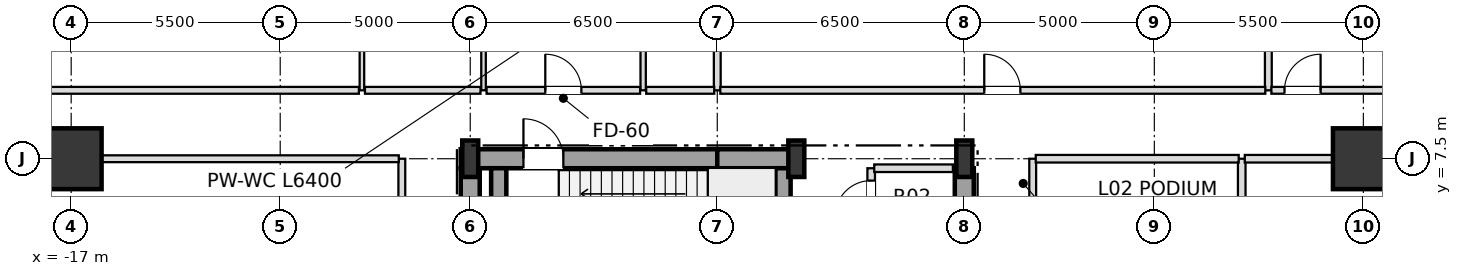
"""IFC4 building model, lengths in metres.
Left out: names, types, materials, properties, quantities, classifications, styles, units other than length and angle.
Written with IfcOpenShell. Run it as: python <this file> out.ifc"""

import sys

from ifc_helpers import new_model, si_unit, direction, frame, frame_2d, origin, origin_2d, place, context, subcontext, project, spatial, rectangle, i_section, extrude, element, fill, save


model = new_model("IFC4")
c1 = context("Model", 3, precision=1e-05, world=origin(), true_north=direction((0.0, 1.0)))
c2 = subcontext(c1, "Body", "Model", "MODEL_VIEW")
j1 = project(units=[si_unit("LENGTHUNIT", "METRE"), si_unit("PLANEANGLEUNIT", "RADIAN")], contexts=[c1])
p1 = place(None, origin())
s1 = spatial("IfcSite", under=j1, at=p1, CompositionType="ELEMENT")
p2 = place(p1, origin())
s2 = spatial("IfcBuilding", under=s1, at=p2, CompositionType="ELEMENT")
p3 = place(p2, frame((0.0, 0.0, 11.4)))
s3 = spatial("IfcBuildingStorey", under=s2, at=p3, CompositionType="ELEMENT", Elevation=11.4)
for number, where, z_axis, x_axis in (
    (1, (-6.5, 7.5, 0.0), (0.0, 0.0, 1.0), (1.0, 0.0, 0.0)),
    (2, (2.08, 7.5, 0.0), (0.0, 0.0, 1.0), (1.0, 0.0, 0.0)),
    (3, (6.5, 7.5, 0.0), (0.0, 0.0, 1.0), (1.0, 0.0, 0.0)),
):
    element("IfcColumn", number, at=place(p3, frame(where, z_axis=z_axis, x_axis=x_axis)), inside=s3, PredefinedType="COLUMN", context=c2, shape_type="SweptSolid", body=[
        extrude(i_section(OverallWidth=0.42, OverallDepth=0.96, WebThickness=0.022, FlangeThickness=0.034, at=origin_2d()), origin(), (0.0, 0.0, 1.0), 5.4),
    ])
for number, where, z_axis, x_axis in (
    (4, (17.0, 7.5, 0.0), (0.0, 0.0, 1.0), (1.0, 0.0, 0.0)),
    (5, (-17.0, 7.5, 0.0), (0.0, 0.0, 1.0), (1.0, 0.0, 0.0)),
):
    element("IfcColumn", number, at=place(p3, frame(where, z_axis=z_axis, x_axis=x_axis)), inside=s3, PredefinedType="USERDEFINED", context=c2, shape_type="SweptSolid", body=[
        extrude(rectangle(XDim=1.6, YDim=1.6, at=origin_2d()), origin(), (0.0, 0.0, 1.0), 5.4),
    ])
p4 = place(p3, frame((-6.75, 7.5, 0.0), z_axis=(0.0, 0.0, 1.0), x_axis=(1.0, 0.0, 0.0)))
e6 = element("IfcWall", 6, at=p4, inside=s3, PredefinedType="SHEAR", context=c2, shape_type="SweptSolid", body=[
    extrude(rectangle(XDim=6.75, YDim=0.5, at=frame_2d((3.375, 0.0))), origin(), (0.0, 0.0, 1.0), 5.12),
])
p5 = place(p4, frame((1.65, 0.0, 0.0)))
e7 = element("IfcOpeningElement", 7, at=p5, cuts=e6, PredefinedType="OPENING", context=c2, shape_type="SweptSolid", body=[
    extrude(rectangle(XDim=1.05, YDim=2.15, at=frame_2d((0.525, 1.075))), frame((0.0, 0.26, 0.0), z_axis=(0.0, -1.0, 0.0), x_axis=(1.0, 0.0, 0.0)), (0.0, 0.0, 1.0), 0.52),
])
p6 = place(p3, frame((0.0, 7.5, 0.0), z_axis=(0.0, 0.0, 1.0), x_axis=(1.0, 0.0, 0.0)))
e8 = element("IfcWall", 8, at=p6, inside=s3, PredefinedType="SHEAR", context=c2, shape_type="SweptSolid", body=[
    extrude(rectangle(XDim=2.08, YDim=0.5, at=frame_2d((1.04, 0.0))), origin(), (0.0, 0.0, 1.0), 5.12),
])
for number, where, z_axis, x_axis in (
    (9, (-6.5, 3.95, 0.0), (0.0, 0.0, 1.0), (0.0, 1.0, 0.0)),
    (10, (6.5, 3.95, 0.0), (0.0, 0.0, 1.0), (0.0, 1.0, 0.0)),
):
    element("IfcWall", number, at=place(p3, frame(where, z_axis=z_axis, x_axis=x_axis)), inside=s3, PredefinedType="SHEAR", context=c2, shape_type="SweptSolid", body=[
        extrude(rectangle(XDim=3.3, YDim=0.5, at=frame_2d((1.65, 0.0))), origin(), (0.0, 0.0, 1.0), 5.12),
    ])
for number, where, z_axis, x_axis in (
    (11, (1.73, 3.95, 0.0), (0.0, 0.0, 1.0), (0.0, 1.0, 0.0)),
    (12, (-5.75, 3.95, 0.0), (0.0, 0.0, 1.0), (0.0, 1.0, 0.0)),
):
    element("IfcWall", number, at=place(p3, frame(where, z_axis=z_axis, x_axis=x_axis)), inside=s3, PredefinedType="SHEAR", context=c2, shape_type="SweptSolid", body=[
        extrude(rectangle(XDim=3.3, YDim=0.4, at=frame_2d((1.65, 0.0))), origin(), (0.0, 0.0, 1.0), 5.12),
    ])
p7 = place(p3, frame((-9.35, 9.3, 0.0), z_axis=(0.0, 0.0, 1.0), x_axis=(0.0, 1.0, 0.0)))
e13 = element("IfcWall", 13, at=p7, inside=s3, PredefinedType="PARTITIONING", context=c2, shape_type="SweptSolid", body=[
    extrude(rectangle(XDim=6.4, YDim=0.12, at=frame_2d((3.2, 0.0))), origin(), (0.0, 0.0, 1.0), 4.41),
])
p8 = place(p7, frame((2.75, 0.0, 0.0)))
e14 = element("IfcOpeningElement", 14, at=p8, cuts=e13, PredefinedType="OPENING", context=c2, shape_type="SweptSolid", body=[
    extrude(rectangle(XDim=0.9, YDim=2.1, at=frame_2d((0.45, 1.05))), frame((0.0, 0.07, 0.0), z_axis=(0.0, -1.0, 0.0), x_axis=(1.0, 0.0, 0.0)), (0.0, 0.0, 1.0), 0.14),
])
p9 = place(p3, frame((-8.3, -7.5, 0.0), z_axis=(0.0, 0.0, 1.0), x_axis=(0.0, 1.0, 0.0)))
e15 = element("IfcWall", 15, at=p9, inside=s3, PredefinedType="PARTITIONING", context=c2, shape_type="SweptSolid", body=[
    extrude(rectangle(XDim=15.0, YDim=0.18, at=frame_2d((7.5, 0.0))), origin(), (0.0, 0.0, 1.0), 5.12),
])
p10 = place(p9, frame((7.025, 0.0, 0.0)))
e16 = element("IfcOpeningElement", 16, at=p10, cuts=e15, PredefinedType="OPENING", context=c2, shape_type="SweptSolid", body=[
    extrude(rectangle(XDim=0.95, YDim=2.15, at=frame_2d((0.475, 1.075))), frame((0.0, 0.1, 0.0), z_axis=(0.0, -1.0, 0.0), x_axis=(1.0, 0.0, 0.0)), (0.0, 0.0, 1.0), 0.2),
])
p11 = place(p3, frame((-6.15, 9.3, 0.0), z_axis=(0.0, 0.0, 1.0), x_axis=(0.0, 1.0, 0.0)))
e17 = element("IfcWall", 17, at=p11, inside=s3, PredefinedType="PARTITIONING", context=c2, shape_type="SweptSolid", body=[
    extrude(rectangle(XDim=6.4, YDim=0.12, at=frame_2d((3.2, 0.0))), origin(), (0.0, 0.0, 1.0), 5.12),
])
p12 = place(p11, frame((2.725, 0.0, 0.0)))
e18 = element("IfcOpeningElement", 18, at=p12, cuts=e17, PredefinedType="OPENING", context=c2, shape_type="SweptSolid", body=[
    extrude(rectangle(XDim=0.95, YDim=2.1, at=frame_2d((0.475, 1.05))), frame((0.0, 0.07, 0.0), z_axis=(0.0, -1.0, 0.0), x_axis=(1.0, 0.0, 0.0)), (0.0, 0.0, 1.0), 0.14),
])
p13 = place(p3, frame((-1.95, 9.3, 0.0), z_axis=(0.0, 0.0, 1.0), x_axis=(0.0, 1.0, 0.0)))
e19 = element("IfcWall", 19, at=p13, inside=s3, PredefinedType="PARTITIONING", context=c2, shape_type="SweptSolid", body=[
    extrude(rectangle(XDim=6.4, YDim=0.14, at=frame_2d((3.2, 0.0))), origin(), (0.0, 0.0, 1.0), 5.12),
])
p14 = place(p13, frame((2.75, 0.0, 0.0)))
e20 = element("IfcOpeningElement", 20, at=p14, cuts=e19, PredefinedType="OPENING", context=c2, shape_type="SweptSolid", body=[
    extrude(rectangle(XDim=0.9, YDim=2.1, at=frame_2d((0.45, 1.05))), frame((0.0, 0.08, 0.0), z_axis=(0.0, -1.0, 0.0), x_axis=(1.0, 0.0, 0.0)), (0.0, 0.0, 1.0), 0.16),
])
p15 = place(p3, frame((0.0, 9.3, 0.0), z_axis=(0.0, 0.0, 1.0), x_axis=(0.0, 1.0, 0.0)))
e21 = element("IfcWall", 21, at=p15, inside=s3, PredefinedType="PARTITIONING", context=c2, shape_type="SweptSolid", body=[
    extrude(rectangle(XDim=12.455, YDim=0.18, at=frame_2d((6.228, 0.0))), origin(), (0.0, 0.0, 1.0), 4.476),
])
p16 = place(p3, frame((4.05, 4.2, 0.0), z_axis=(0.0, 0.0, 1.0), x_axis=(0.0, 1.0, 0.0)))
e22 = element("IfcWall", 22, at=p16, inside=s3, PredefinedType="SOLIDWALL", context=c2, shape_type="SweptSolid", body=[
    extrude(rectangle(XDim=3.05, YDim=0.2, at=frame_2d((1.525, 0.0))), origin(), (0.0, 0.0, 1.0), 5.12),
])
p17 = place(p16, frame((0.275, 0.0, 0.0)))
e23 = element("IfcOpeningElement", 23, at=p17, cuts=e22, PredefinedType="OPENING", context=c2, shape_type="SweptSolid", body=[
    extrude(rectangle(XDim=0.95, YDim=2.15, at=frame_2d((0.475, 1.075))), frame((0.0, 0.11, 0.0), z_axis=(0.0, -1.0, 0.0), x_axis=(1.0, 0.0, 0.0)), (0.0, 0.0, 1.0), 0.22),
])
p18 = place(p16, frame((1.775, 0.0, 0.0)))
e24 = element("IfcOpeningElement", 24, at=p18, cuts=e22, PredefinedType="OPENING", context=c2, shape_type="SweptSolid", body=[
    extrude(rectangle(XDim=0.95, YDim=2.15, at=frame_2d((0.475, 1.075))), frame((0.0, 0.11, 0.0), z_axis=(0.0, -1.0, 0.0), x_axis=(1.0, 0.0, 0.0)), (0.0, 0.0, 1.0), 0.22),
])
p19 = place(p3, frame((8.3, -7.5, 0.0), z_axis=(0.0, 0.0, 1.0), x_axis=(0.0, 1.0, 0.0)))
e25 = element("IfcWall", 25, at=p19, inside=s3, PredefinedType="PARTITIONING", context=c2, shape_type="SweptSolid", body=[
    extrude(rectangle(XDim=15.0, YDim=0.18, at=frame_2d((7.5, 0.0))), origin(), (0.0, 0.0, 1.0), 5.12),
])
p20 = place(p19, frame((5.025, 0.0, 0.0)))
e26 = element("IfcOpeningElement", 26, at=p20, cuts=e25, PredefinedType="OPENING", context=c2, shape_type="SweptSolid", body=[
    extrude(rectangle(XDim=0.95, YDim=2.15, at=frame_2d((0.475, 1.075))), frame((0.0, 0.1, 0.0), z_axis=(0.0, -1.0, 0.0), x_axis=(1.0, 0.0, 0.0)), (0.0, 0.0, 1.0), 0.2),
])
p21 = place(p19, frame((12.225, 0.0, 0.0)))
e27 = element("IfcOpeningElement", 27, at=p21, cuts=e25, PredefinedType="OPENING", context=c2, shape_type="SweptSolid", body=[
    extrude(rectangle(XDim=0.95, YDim=2.15, at=frame_2d((0.475, 1.075))), frame((0.0, 0.1, 0.0), z_axis=(0.0, -1.0, 0.0), x_axis=(1.0, 0.0, 0.0)), (0.0, 0.0, 1.0), 0.2),
])
p22 = place(p3, frame((13.8, 3.2, 0.0), z_axis=(0.0, 0.0, 1.0), x_axis=(0.0, 1.0, 0.0)))
e28 = element("IfcWall", 28, at=p22, inside=s3, PredefinedType="SOLIDWALL", context=c2, shape_type="SweptSolid", body=[
    extrude(rectangle(XDim=4.3, YDim=0.2, at=frame_2d((2.15, 0.0))), origin(), (0.0, 0.0, 1.0), 5.12),
])
p23 = place(p3, frame((14.5, 9.3, 0.0), z_axis=(0.0, 0.0, 1.0), x_axis=(0.0, 1.0, 0.0)))
e29 = element("IfcWall", 29, at=p23, inside=s3, PredefinedType="PARTITIONING", context=c2, shape_type="SweptSolid", body=[
    extrude(rectangle(XDim=12.395, YDim=0.18, at=frame_2d((6.198, 0.0))), origin(), (0.0, 0.0, 1.0), 4.41),
])
p24 = place(p3, frame((4.13, 7.25, 0.0), z_axis=(0.0, 0.0, 1.0), x_axis=(1.0, 0.0, 0.0)))
e30 = element("IfcWall", 30, at=p24, inside=s3, PredefinedType="SOLIDWALL", context=c2, shape_type="SweptSolid", body=[
    extrude(rectangle(XDim=2.07, YDim=0.2, at=frame_2d((1.035, 0.0))), origin(), (0.0, 0.0, 1.0), 4.41),
])
p25 = place(p3, frame((-22.695, 7.5, 0.0), z_axis=(0.0, 0.0, 1.0), x_axis=(1.0, 0.0, 0.0)))
e31 = element("IfcWall", 31, at=p25, inside=s3, PredefinedType="PARTITIONING", context=c2, shape_type="SweptSolid", body=[
    extrude(rectangle(XDim=14.315, YDim=0.18, at=frame_2d((7.158, 0.0))), origin(), (0.0, 0.0, 1.0), 4.41),
])
p26 = place(p3, frame((8.38, 7.5, 0.0), z_axis=(0.0, 0.0, 1.0), x_axis=(1.0, 0.0, 0.0)))
e32 = element("IfcWall", 32, at=p26, inside=s3, PredefinedType="SOLIDWALL", context=c2, shape_type="SweptSolid", body=[
    extrude(rectangle(XDim=5.34, YDim=0.2, at=frame_2d((2.67, 0.0))), origin(), (0.0, 0.0, 1.0), 4.41),
])
p27 = place(p3, frame((13.88, 7.5, 0.0), z_axis=(0.0, 0.0, 1.0), x_axis=(1.0, 0.0, 0.0)))
e33 = element("IfcWall", 33, at=p27, inside=s3, PredefinedType="SOLIDWALL", context=c2, shape_type="SweptSolid", body=[
    extrude(rectangle(XDim=8.855, YDim=0.2, at=frame_2d((4.428, 0.0))), origin(), (0.0, 0.0, 1.0), 4.41),
])
p28 = place(p3, frame((-22.695, 9.3, 0.0), z_axis=(0.0, 0.0, 1.0), x_axis=(1.0, 0.0, 0.0)))
e34 = element("IfcWall", 34, at=p28, inside=s3, PredefinedType="PARTITIONING", context=c2, shape_type="SweptSolid", body=[
    extrude(rectangle(XDim=13.265, YDim=0.18, at=frame_2d((6.633, 0.0))), origin(), (0.0, 0.0, 1.0), 4.41),
])
p29 = place(p3, frame((-9.27, 9.3, 0.0), z_axis=(0.0, 0.0, 1.0), x_axis=(1.0, 0.0, 0.0)))
e35 = element("IfcWall", 35, at=p29, inside=s3, PredefinedType="PARTITIONING", context=c2, shape_type="SweptSolid", body=[
    extrude(rectangle(XDim=3.04, YDim=0.18, at=frame_2d((1.52, 0.0))), origin(), (0.0, 0.0, 1.0), 4.41),
])
p30 = place(p3, frame((-6.07, 9.3, 0.0), z_axis=(0.0, 0.0, 1.0), x_axis=(1.0, 0.0, 0.0)))
e36 = element("IfcWall", 36, at=p30, inside=s3, PredefinedType="PARTITIONING", context=c2, shape_type="SweptSolid", body=[
    extrude(rectangle(XDim=4.04, YDim=0.18, at=frame_2d((2.02, 0.0))), origin(), (0.0, 0.0, 1.0), 5.12),
])
p31 = place(p30, frame((1.545, 0.0, 0.0)))
e37 = element("IfcOpeningElement", 37, at=p31, cuts=e36, PredefinedType="OPENING", context=c2, shape_type="SweptSolid", body=[
    extrude(rectangle(XDim=0.95, YDim=2.15, at=frame_2d((0.475, 1.075))), frame((0.0, 0.1, 0.0), z_axis=(0.0, -1.0, 0.0), x_axis=(1.0, 0.0, 0.0)), (0.0, 0.0, 1.0), 0.2),
])
p32 = place(p3, frame((-1.87, 9.3, 0.0), z_axis=(0.0, 0.0, 1.0), x_axis=(1.0, 0.0, 0.0)))
e38 = element("IfcWall", 38, at=p32, inside=s3, PredefinedType="PARTITIONING", context=c2, shape_type="SweptSolid", body=[
    extrude(rectangle(XDim=1.79, YDim=0.18, at=frame_2d((0.895, 0.0))), origin(), (0.0, 0.0, 1.0), 5.12),
])
p33 = place(p3, frame((0.08, 9.3, 0.0), z_axis=(0.0, 0.0, 1.0), x_axis=(1.0, 0.0, 0.0)))
e39 = element("IfcWall", 39, at=p33, inside=s3, PredefinedType="PARTITIONING", context=c2, shape_type="SweptSolid", body=[
    extrude(rectangle(XDim=14.34, YDim=0.18, at=frame_2d((7.17, 0.0))), origin(), (0.0, 0.0, 1.0), 4.41),
])
p34 = place(p33, frame((6.945, 0.0, 0.0)))
e40 = element("IfcOpeningElement", 40, at=p34, cuts=e39, PredefinedType="OPENING", context=c2, shape_type="SweptSolid", body=[
    extrude(rectangle(XDim=0.95, YDim=2.15, at=frame_2d((0.475, 1.075))), frame((0.0, 0.1, 0.0), z_axis=(0.0, -1.0, 0.0), x_axis=(1.0, 0.0, 0.0)), (0.0, 0.0, 1.0), 0.2),
])
p35 = place(p3, frame((14.58, 9.3, 0.0), z_axis=(0.0, 0.0, 1.0), x_axis=(1.0, 0.0, 0.0)))
e41 = element("IfcWall", 41, at=p35, inside=s3, PredefinedType="PARTITIONING", context=c2, shape_type="SweptSolid", body=[
    extrude(rectangle(XDim=8.155, YDim=0.18, at=frame_2d((4.078, 0.0))), origin(), (0.0, 0.0, 1.0), 4.41),
])
p36 = place(p35, frame((0.345, 0.0, 0.0)))
e42 = element("IfcOpeningElement", 42, at=p36, cuts=e41, PredefinedType="OPENING", context=c2, shape_type="SweptSolid", body=[
    extrude(rectangle(XDim=0.95, YDim=2.15, at=frame_2d((0.475, 1.075))), frame((0.0, 0.1, 0.0), z_axis=(0.0, -1.0, 0.0), x_axis=(1.0, 0.0, 0.0)), (0.0, 0.0, 1.0), 0.2),
])
p37 = place(p5, origin())
e43 = element("IfcDoor", 43, at=p37, inside=s3, OperationType="SINGLE_SWING_LEFT", PredefinedType="DOOR", context=c2, shape_type="SweptSolid", body=[
    extrude(rectangle(XDim=1.05, YDim=2.15, at=frame_2d((0.525, 1.075))), frame((0.0, 0.025, 0.0), z_axis=(0.0, -1.0, 0.0), x_axis=(1.0, 0.0, 0.0)), (0.0, 0.0, 1.0), 0.05),
])
fill(e7, e43)
p38 = place(p18, origin())
e44 = element("IfcDoor", 44, at=p38, inside=s3, OperationType="SINGLE_SWING_LEFT", PredefinedType="DOOR", context=c2, shape_type="SweptSolid", body=[
    extrude(rectangle(XDim=0.95, YDim=2.15, at=frame_2d((0.475, 1.075))), frame((0.0, 0.025, 0.0), z_axis=(0.0, -1.0, 0.0), x_axis=(1.0, 0.0, 0.0)), (0.0, 0.0, 1.0), 0.05),
])
fill(e24, e44)
p39 = place(p31, origin())
e45 = element("IfcDoor", 45, at=p39, inside=s3, OperationType="SINGLE_SWING_LEFT", PredefinedType="DOOR", context=c2, shape_type="SweptSolid", body=[
    extrude(rectangle(XDim=0.95, YDim=2.15, at=frame_2d((0.475, 1.075))), frame((0.0, 0.025, 0.0), z_axis=(0.0, -1.0, 0.0), x_axis=(1.0, 0.0, 0.0)), (0.0, 0.0, 1.0), 0.05),
])
fill(e37, e45)
p40 = place(p34, origin())
e46 = element("IfcDoor", 46, at=p40, inside=s3, OperationType="SINGLE_SWING_LEFT", PredefinedType="DOOR", context=c2, shape_type="SweptSolid", body=[
    extrude(rectangle(XDim=0.95, YDim=2.15, at=frame_2d((0.475, 1.075))), frame((0.0, 0.025, 0.0), z_axis=(0.0, -1.0, 0.0), x_axis=(1.0, 0.0, 0.0)), (0.0, 0.0, 1.0), 0.05),
])
fill(e40, e46)
p41 = place(p36, origin())
e47 = element("IfcDoor", 47, at=p41, inside=s3, OperationType="SINGLE_SWING_RIGHT", PredefinedType="DOOR", context=c2, shape_type="SweptSolid", body=[
    extrude(rectangle(XDim=0.95, YDim=2.15, at=frame_2d((0.475, 1.075))), frame((0.0, 0.025, 0.0), z_axis=(0.0, -1.0, 0.0), x_axis=(1.0, 0.0, 0.0)), (0.0, 0.0, 1.0), 0.05),
])
fill(e42, e47)
save(model, sys.argv[1])
